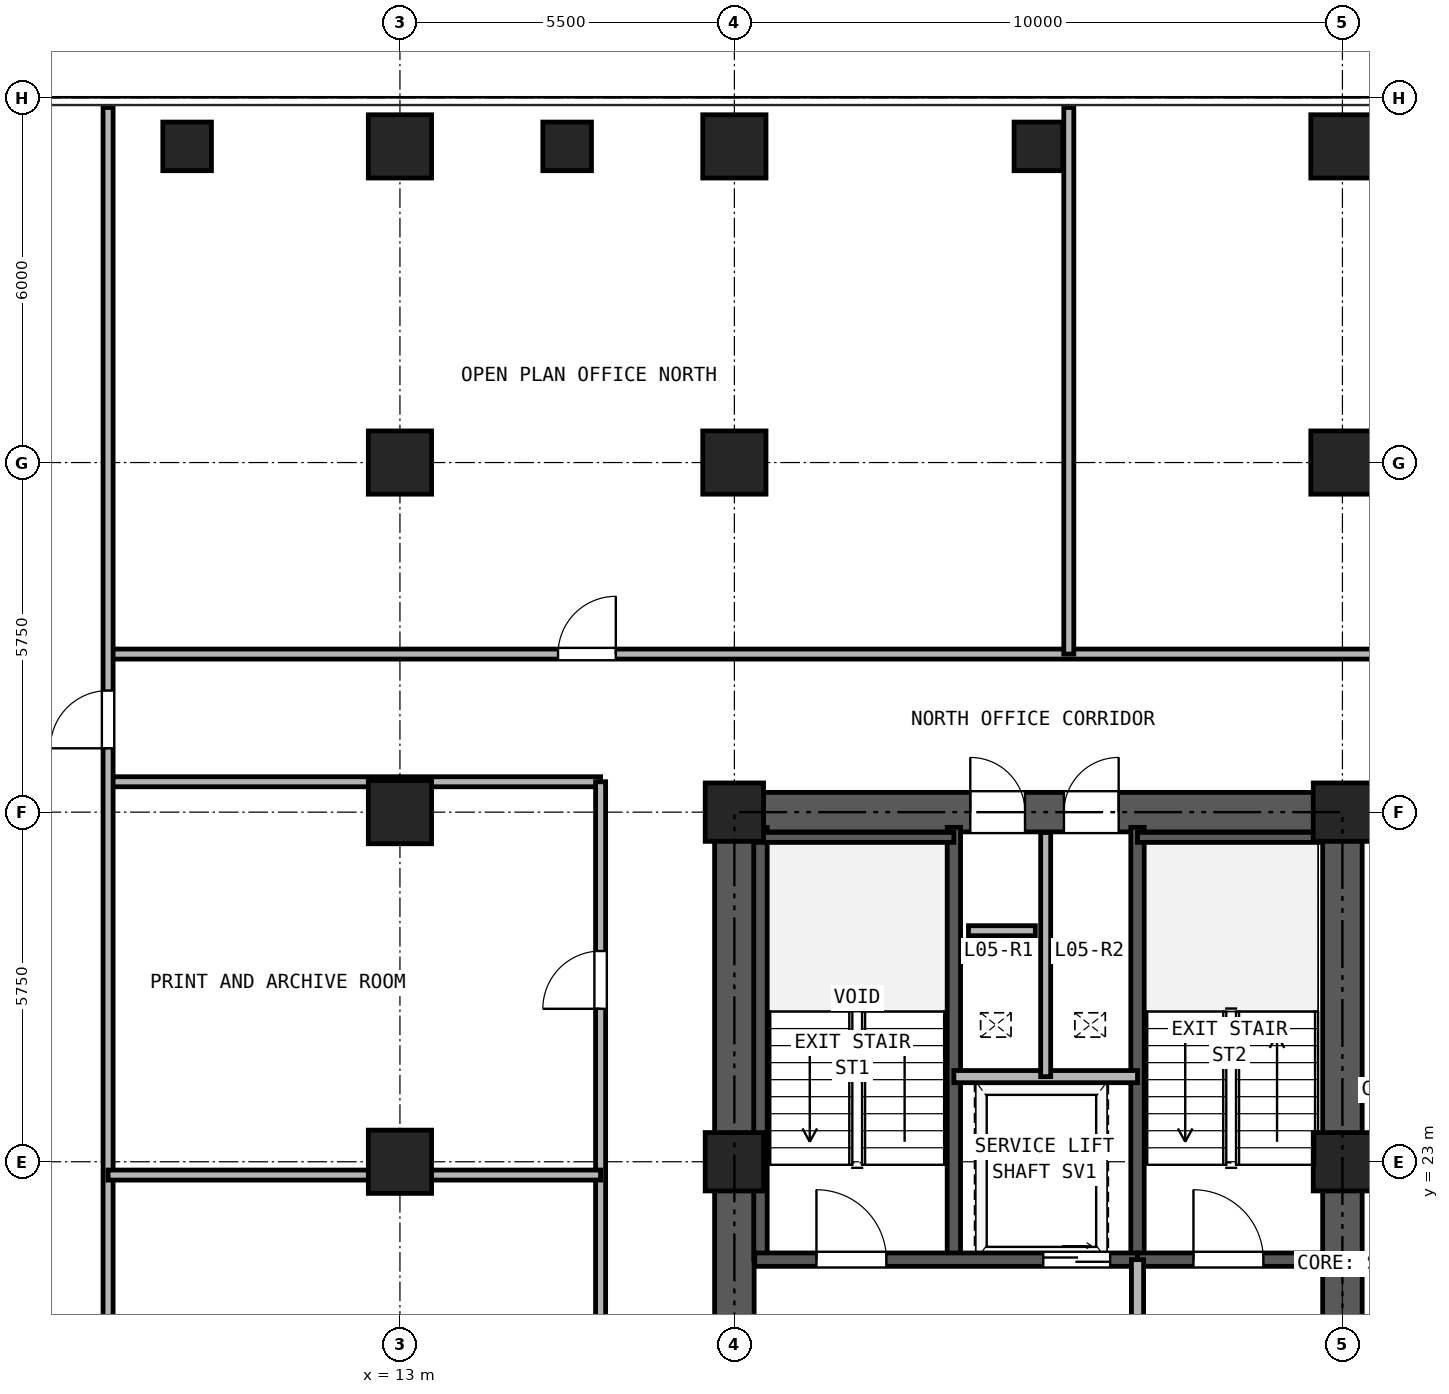
"""IFC4 building model, lengths in metres.
Left out: names, types, materials, properties, quantities, classifications, styles, units other than length and angle.
Written with IfcOpenShell. Run it as: python <this file> out.ifc"""

import sys

from ifc_helpers import new_model, si_unit, direction, frame, frame_2d, origin, origin_2d, place, context, subcontext, project, spatial, rectangle, hollow_rectangle, extrude, source, transform, mapped, element, fill, save


model = new_model("IFC4")
c1 = context("Model", 3, precision=1e-05, world=origin(), true_north=direction((0.0, 1.0)))
c2 = subcontext(c1, "Body", "Model", "MODEL_VIEW")
j1 = project(units=[si_unit("LENGTHUNIT", "METRE"), si_unit("PLANEANGLEUNIT", "RADIAN")], contexts=[c1])
p1 = place(None, origin())
s1 = spatial("IfcSite", under=j1, at=p1, CompositionType="ELEMENT")
p2 = place(p1, origin())
s2 = spatial("IfcBuilding", under=s1, at=p2, CompositionType="ELEMENT")
p3 = place(p2, frame((0.0, 0.0, 22.5)))
s3 = spatial("IfcBuildingStorey", under=s2, at=p3, CompositionType="ELEMENT", Elevation=22.5)
m1 = source(origin(), c2, "Body", "SweptSolid", [
    extrude(hollow_rectangle(XDim=1.04, YDim=1.04, WallThickness=0.065, at=origin_2d()), origin(), (0.0, 0.0, 1.0), 3.32),
])
for number, where, z_axis, x_axis in (
    (1, (13.0, 39.7, 0.0), (0.0, 0.0, 1.0), (1.0, 0.0, 0.0)),
    (2, (18.5, 39.7, 0.0), (0.0, 0.0, 1.0), (1.0, 0.0, 0.0)),
    (3, (28.5, 39.7, 0.0), (0.0, 0.0, 1.0), (1.0, 0.0, 0.0)),
    (4, (13.0, 23.0, 0.0), (0.0, 0.0, 1.0), (1.0, 0.0, 0.0)),
    (5, (13.0, 28.75, 0.0), (0.0, 0.0, 1.0), (1.0, 0.0, 0.0)),
    (6, (13.0, 34.5, 0.0), (0.0, 0.0, 1.0), (1.0, 0.0, 0.0)),
):
    element("IfcColumn", number, at=place(p3, frame(where, z_axis=z_axis, x_axis=x_axis)), inside=s3, PredefinedType="COLUMN", context=c2, shape_type="MappedRepresentation", body=[
        mapped(m1, transform((0.0, 0.0, 0.0), x_axis=(1.0, 0.0, 0.0), y_axis=(0.0, 1.0, 0.0), z_axis=(0.0, 0.0, 1.0), scale=1.0)),
    ])
m2 = source(origin(), c2, "Body", "SweptSolid", [
    extrude(hollow_rectangle(XDim=0.96, YDim=0.96, WallThickness=0.06, at=origin_2d()), origin(), (0.0, 0.0, 1.0), 3.32),
])
for number, where, z_axis, x_axis in (
    (7, (18.5, 23.0, 0.0), (0.0, 0.0, 1.0), (1.0, 0.0, 0.0)),
    (8, (18.5, 28.75, 0.0), (0.0, 0.0, 1.0), (1.0, 0.0, 0.0)),
):
    element("IfcColumn", number, at=place(p3, frame(where, z_axis=z_axis, x_axis=x_axis)), inside=s3, PredefinedType="COLUMN", context=c2, shape_type="MappedRepresentation", body=[
        mapped(m2, transform((0.0, 0.0, 0.0), x_axis=(1.0, 0.0, 0.0), y_axis=(0.0, 1.0, 0.0), z_axis=(0.0, 0.0, 1.0), scale=1.0)),
    ])
p4 = place(p3, frame((18.5, 34.5, 0.0), z_axis=(0.0, 0.0, 1.0), x_axis=(1.0, 0.0, 0.0)))
e9 = element("IfcColumn", 9, at=p4, inside=s3, PredefinedType="COLUMN", context=c2, shape_type="MappedRepresentation", body=[
    mapped(m1, transform((0.0, 0.0, 0.0), x_axis=(1.0, 0.0, 0.0), y_axis=(0.0, 1.0, 0.0), z_axis=(0.0, 0.0, 1.0), scale=1.0)),
])
for number, where, z_axis, x_axis in (
    (10, (28.5, 23.0, 0.0), (0.0, 0.0, 1.0), (1.0, 0.0, 0.0)),
    (11, (28.5, 28.75, 0.0), (0.0, 0.0, 1.0), (1.0, 0.0, 0.0)),
):
    element("IfcColumn", number, at=place(p3, frame(where, z_axis=z_axis, x_axis=x_axis)), inside=s3, PredefinedType="COLUMN", context=c2, shape_type="MappedRepresentation", body=[
        mapped(m2, transform((0.0, 0.0, 0.0), x_axis=(1.0, 0.0, 0.0), y_axis=(0.0, 1.0, 0.0), z_axis=(0.0, 0.0, 1.0), scale=1.0)),
    ])
p5 = place(p3, frame((28.5, 34.5, 0.0), z_axis=(0.0, 0.0, 1.0), x_axis=(1.0, 0.0, 0.0)))
e12 = element("IfcColumn", 12, at=p5, inside=s3, PredefinedType="COLUMN", context=c2, shape_type="MappedRepresentation", body=[
    mapped(m1, transform((0.0, 0.0, 0.0), x_axis=(1.0, 0.0, 0.0), y_axis=(0.0, 1.0, 0.0), z_axis=(0.0, 0.0, 1.0), scale=1.0)),
])
m3 = source(origin(), c2, "Body", "SweptSolid", [
    extrude(hollow_rectangle(XDim=0.8, YDim=0.8, WallThickness=0.045, at=origin_2d()), origin(), (0.0, 0.0, 1.0), 3.68),
])
for number, where, z_axis, x_axis in (
    (13, (9.5, 39.7, -0.36), (0.0, 0.0, 1.0), (1.0, 0.0, 0.0)),
    (14, (15.75, 39.7, -0.36), (0.0, 0.0, 1.0), (1.0, 0.0, 0.0)),
    (15, (23.5, 39.7, -0.36), (0.0, 0.0, 1.0), (1.0, 0.0, 0.0)),
):
    element("IfcColumn", number, at=place(p3, frame(where, z_axis=z_axis, x_axis=x_axis)), inside=s3, PredefinedType="COLUMN", context=c2, shape_type="MappedRepresentation", body=[
        mapped(m3, transform((0.0, 0.0, 0.0), x_axis=(1.0, 0.0, 0.0), y_axis=(0.0, 1.0, 0.0), z_axis=(0.0, 0.0, 1.0), scale=1.0)),
    ])
p6 = place(p3, frame((18.175, 28.75, 0.0), z_axis=(0.0, 0.0, 1.0), x_axis=(1.0, 0.0, 0.0)))
e16 = element("IfcWall", 16, at=p6, inside=s3, PredefinedType="SHEAR", context=c2, shape_type="SweptSolid", body=[
    extrude(rectangle(XDim=10.65, YDim=0.65, at=frame_2d((5.325, 0.0))), origin(), (0.0, 0.0, 1.0), 3.32),
])
p7 = place(p6, frame((4.205, 0.0, 0.0)))
e17 = element("IfcOpeningElement", 17, at=p7, cuts=e16, PredefinedType="OPENING", context=c2, shape_type="SweptSolid", body=[
    extrude(rectangle(XDim=0.9, YDim=2.05, at=frame_2d((0.45, 1.025))), frame((0.0, 0.335, 0.0), z_axis=(0.0, -1.0, 0.0), x_axis=(1.0, 0.0, 0.0)), (0.0, 0.0, 1.0), 0.67),
])
p8 = place(p6, frame((5.745, 0.0, 0.0)))
e18 = element("IfcOpeningElement", 18, at=p8, cuts=e16, PredefinedType="OPENING", context=c2, shape_type="SweptSolid", body=[
    extrude(rectangle(XDim=0.9, YDim=2.05, at=frame_2d((0.45, 1.025))), frame((0.0, 0.335, 0.0), z_axis=(0.0, -1.0, 0.0), x_axis=(1.0, 0.0, 0.0)), (0.0, 0.0, 1.0), 0.67),
])
p9 = place(p3, frame((18.5, 11.825, 0.0), z_axis=(0.0, 0.0, 1.0), x_axis=(0.0, 1.0, 0.0)))
e19 = element("IfcWall", 19, at=p9, inside=s3, PredefinedType="SHEAR", context=c2, shape_type="SweptSolid", body=[
    extrude(rectangle(XDim=16.6, YDim=0.65, at=frame_2d((8.3, 0.0))), origin(), (0.0, 0.0, 1.0), 3.32),
])
p10 = place(p9, frame((7.325, 0.0, 0.0)))
e20 = element("IfcOpeningElement", 20, at=p10, cuts=e19, PredefinedType="OPENING", context=c2, shape_type="SweptSolid", body=[
    extrude(rectangle(XDim=1.15, YDim=2.2, at=frame_2d((0.575, 1.1))), frame((0.0, 0.335, 0.0), z_axis=(0.0, -1.0, 0.0), x_axis=(1.0, 0.0, 0.0)), (0.0, 0.0, 1.0), 0.67),
])
p11 = place(p3, frame((28.5, 11.825, 0.0), z_axis=(0.0, 0.0, 1.0), x_axis=(0.0, 1.0, 0.0)))
e21 = element("IfcWall", 21, at=p11, inside=s3, PredefinedType="SHEAR", context=c2, shape_type="SweptSolid", body=[
    extrude(rectangle(XDim=16.6, YDim=0.65, at=frame_2d((8.3, 0.0))), origin(), (0.0, 0.0, 1.0), 3.32),
])
p12 = place(p11, frame((7.325, 0.0, 0.0)))
e22 = element("IfcOpeningElement", 22, at=p12, cuts=e21, PredefinedType="OPENING", context=c2, shape_type="SweptSolid", body=[
    extrude(rectangle(XDim=1.15, YDim=2.2, at=frame_2d((0.575, 1.1))), frame((0.0, 0.335, 0.0), z_axis=(0.0, -1.0, 0.0), x_axis=(1.0, 0.0, 0.0)), (0.0, 0.0, 1.0), 0.67),
])
for number, where, z_axis, x_axis in (
    (23, (18.93, 21.39, 0.0), (0.0, 0.0, 1.0), (0.0, 1.0, 0.0)),
    (24, (22.11, 21.39, 0.0), (0.0, 0.0, 1.0), (0.0, 1.0, 0.0)),
    (25, (25.13, 21.39, 0.0), (0.0, 0.0, 1.0), (0.0, 1.0, 0.0)),
):
    element("IfcWall", number, at=place(p3, frame(where, z_axis=z_axis, x_axis=x_axis)), inside=s3, PredefinedType="SOLIDWALL", context=c2, shape_type="SweptSolid", body=[
        extrude(rectangle(XDim=7.11, YDim=0.22, at=frame_2d((3.555, 0.0))), origin(), (0.0, 0.0, 1.0), 3.32),
    ])
p13 = place(p3, frame((18.835, 28.335, 0.0), z_axis=(0.0, 0.0, 1.0), x_axis=(1.0, 0.0, 0.0)))
e26 = element("IfcWall", 26, at=p13, inside=s3, PredefinedType="PARTITIONING", context=c2, shape_type="SweptSolid", body=[
    extrude(rectangle(XDim=3.275, YDim=0.165, at=frame_2d((1.638, 0.0))), origin(), (0.0, 0.0, 1.0), 3.32),
])
p14 = place(p3, frame((25.13, 28.335, 0.0), z_axis=(0.0, 0.0, 1.0), x_axis=(1.0, 0.0, 0.0)))
e27 = element("IfcWall", 27, at=p14, inside=s3, PredefinedType="PARTITIONING", context=c2, shape_type="SweptSolid", body=[
    extrude(rectangle(XDim=3.035, YDim=0.165, at=frame_2d((1.518, 0.0))), origin(), (0.0, 0.0, 1.0), 3.32),
])
p15 = place(p3, frame((18.835, 21.39, 0.0), z_axis=(0.0, 0.0, 1.0), x_axis=(1.0, 0.0, 0.0)))
e28 = element("IfcWall", 28, at=p15, inside=s3, PredefinedType="SOLIDWALL", context=c2, shape_type="SweptSolid", body=[
    extrude(rectangle(XDim=6.295, YDim=0.22, at=frame_2d((3.147, 0.0))), origin(), (0.0, 0.0, 1.0), 3.32),
])
p16 = place(p15, frame((1.015, 0.0, 0.0)))
e29 = element("IfcOpeningElement", 29, at=p16, cuts=e28, PredefinedType="OPENING", context=c2, shape_type="SweptSolid", body=[
    extrude(rectangle(XDim=1.15, YDim=2.2, at=frame_2d((0.575, 1.1))), frame((0.0, 0.12, 0.0), z_axis=(0.0, -1.0, 0.0), x_axis=(1.0, 0.0, 0.0)), (0.0, 0.0, 1.0), 0.24),
])
p17 = place(p15, frame((4.745, 0.0, 0.0)))
e30 = element("IfcOpeningElement", 30, at=p17, cuts=e28, PredefinedType="OPENING", context=c2, shape_type="SweptSolid", body=[
    extrude(rectangle(XDim=1.1, YDim=2.25, at=frame_2d((0.55, 1.125))), frame((0.0, 0.12, 0.0), z_axis=(0.0, -1.0, 0.0), x_axis=(1.0, 0.0, 0.0)), (0.0, 0.0, 1.0), 0.24),
])
p18 = place(p3, frame((25.13, 21.39, 0.0), z_axis=(0.0, 0.0, 1.0), x_axis=(1.0, 0.0, 0.0)))
e31 = element("IfcWall", 31, at=p18, inside=s3, PredefinedType="SOLIDWALL", context=c2, shape_type="SweptSolid", body=[
    extrude(rectangle(XDim=3.035, YDim=0.22, at=frame_2d((1.518, 0.0))), origin(), (0.0, 0.0, 1.0), 3.32),
])
p19 = place(p18, frame((0.92, 0.0, 0.0)))
e32 = element("IfcOpeningElement", 32, at=p19, cuts=e31, PredefinedType="OPENING", context=c2, shape_type="SweptSolid", body=[
    extrude(rectangle(XDim=1.15, YDim=2.2, at=frame_2d((0.575, 1.1))), frame((0.0, 0.12, 0.0), z_axis=(0.0, -1.0, 0.0), x_axis=(1.0, 0.0, 0.0)), (0.0, 0.0, 1.0), 0.24),
])
p20 = place(p3, frame((22.11, 24.4, 0.0), z_axis=(0.0, 0.0, 1.0), x_axis=(1.0, 0.0, 0.0)))
e33 = element("IfcWall", 33, at=p20, inside=s3, PredefinedType="PARTITIONING", context=c2, shape_type="SweptSolid", body=[
    extrude(rectangle(XDim=3.02, YDim=0.2, at=frame_2d((1.51, 0.0))), origin(), (0.0, 0.0, 1.0), 3.32),
])
p21 = place(p3, frame((23.62, 24.4, 0.0), z_axis=(0.0, 0.0, 1.0), x_axis=(0.0, 1.0, 0.0)))
e34 = element("IfcWall", 34, at=p21, inside=s3, PredefinedType="PARTITIONING", context=c2, shape_type="SweptSolid", body=[
    extrude(rectangle(XDim=4.015, YDim=0.165, at=frame_2d((2.008, 0.0))), origin(), (0.0, 0.0, 1.0), 3.32),
])
p22 = place(p3, frame((25.13, 18.0, 0.0), z_axis=(0.0, 0.0, 1.0), x_axis=(0.0, 1.0, 0.0)))
e35 = element("IfcWall", 35, at=p22, inside=s3, PredefinedType="PARTITIONING", context=c2, shape_type="SweptSolid", body=[
    extrude(rectangle(XDim=3.39, YDim=0.2, at=frame_2d((1.695, 0.0))), origin(), (0.0, 0.0, 1.0), 3.32),
])
p23 = place(p22, frame((1.1, 0.0, 0.0)))
e36 = element("IfcOpeningElement", 36, at=p23, cuts=e35, PredefinedType="OPENING", context=c2, shape_type="SweptSolid", body=[
    extrude(rectangle(XDim=1.15, YDim=2.2, at=frame_2d((0.575, 1.1))), frame((0.0, 0.11, 0.0), z_axis=(0.0, -1.0, 0.0), x_axis=(1.0, 0.0, 0.0)), (0.0, 0.0, 1.0), 0.22),
])
p24 = place(p3, frame((8.2, 31.35, 0.0), z_axis=(0.0, 0.0, 1.0), x_axis=(1.0, 0.0, 0.0)))
e37 = element("IfcWall", 37, at=p24, inside=s3, PredefinedType="PARTITIONING", context=c2, shape_type="SweptSolid", body=[
    extrude(rectangle(XDim=30.6, YDim=0.165, at=frame_2d((15.3, 0.0))), origin(), (0.0, 0.0, 1.0), 3.32),
])
p25 = place(p24, frame((7.4, 0.0, 0.0)))
e38 = element("IfcOpeningElement", 38, at=p25, cuts=e37, PredefinedType="OPENING", context=c2, shape_type="SweptSolid", body=[
    extrude(rectangle(XDim=0.95, YDim=2.15, at=frame_2d((0.475, 1.075))), frame((0.0, 0.093, 0.0), z_axis=(0.0, -1.0, 0.0), x_axis=(1.0, 0.0, 0.0)), (0.0, 0.0, 1.0), 0.185),
])
p26 = place(p24, frame((22.7, 0.0, 0.0)))
e39 = element("IfcOpeningElement", 39, at=p26, cuts=e37, PredefinedType="OPENING", context=c2, shape_type="SweptSolid", body=[
    extrude(rectangle(XDim=0.95, YDim=2.15, at=frame_2d((0.475, 1.075))), frame((0.0, 0.093, 0.0), z_axis=(0.0, -1.0, 0.0), x_axis=(1.0, 0.0, 0.0)), (0.0, 0.0, 1.0), 0.185),
])
p27 = place(p3, frame((8.2, 29.25, 0.0), z_axis=(0.0, 0.0, 1.0), x_axis=(1.0, 0.0, 0.0)))
e40 = element("IfcWall", 40, at=p27, inside=s3, PredefinedType="PARTITIONING", context=c2, shape_type="SweptSolid", body=[
    extrude(rectangle(XDim=8.1, YDim=0.165, at=frame_2d((4.05, 0.0))), origin(), (0.0, 0.0, 1.0), 3.32),
])
p28 = place(p3, frame((16.3, 10.9, 0.0), z_axis=(0.0, 0.0, 1.0), x_axis=(0.0, 1.0, 0.0)))
e41 = element("IfcWall", 41, at=p28, inside=s3, PredefinedType="PARTITIONING", context=c2, shape_type="SweptSolid", body=[
    extrude(rectangle(XDim=18.35, YDim=0.165, at=frame_2d((9.175, 0.0))), origin(), (0.0, 0.0, 1.0), 3.32),
])
p29 = place(p28, frame((5.44, 0.0, 0.0)))
e42 = element("IfcOpeningElement", 42, at=p29, cuts=e41, PredefinedType="OPENING", context=c2, shape_type="SweptSolid", body=[
    extrude(rectangle(XDim=0.95, YDim=2.15, at=frame_2d((0.475, 1.075))), frame((0.0, 0.093, 0.0), z_axis=(0.0, -1.0, 0.0), x_axis=(1.0, 0.0, 0.0)), (0.0, 0.0, 1.0), 0.185),
])
p30 = place(p28, frame((14.616, 0.0, 0.0)))
e43 = element("IfcOpeningElement", 43, at=p30, cuts=e41, PredefinedType="OPENING", context=c2, shape_type="SweptSolid", body=[
    extrude(rectangle(XDim=0.95, YDim=2.15, at=frame_2d((0.475, 1.075))), frame((0.0, 0.093, 0.0), z_axis=(0.0, -1.0, 0.0), x_axis=(1.0, 0.0, 0.0)), (0.0, 0.0, 1.0), 0.185),
])
p31 = place(p3, frame((8.2, 0.16, 0.0), z_axis=(0.0, 0.0, 1.0), x_axis=(0.0, 1.0, 0.0)))
e44 = element("IfcWall", 44, at=p31, inside=s3, PredefinedType="PARTITIONING", context=c2, shape_type="SweptSolid", body=[
    extrude(rectangle(XDim=40.18, YDim=0.165, at=frame_2d((20.09, 0.0))), origin(), (0.0, 0.0, 1.0), 3.32),
])
p32 = place(p31, frame((9.19, 0.0, 0.0)))
e45 = element("IfcOpeningElement", 45, at=p32, cuts=e44, PredefinedType="OPENING", context=c2, shape_type="SweptSolid", body=[
    extrude(rectangle(XDim=0.95, YDim=2.15, at=frame_2d((0.475, 1.075))), frame((0.0, 0.093, 0.0), z_axis=(0.0, -1.0, 0.0), x_axis=(1.0, 0.0, 0.0)), (0.0, 0.0, 1.0), 0.185),
])
p33 = place(p31, frame((29.64, 0.0, 0.0)))
e46 = element("IfcOpeningElement", 46, at=p33, cuts=e44, PredefinedType="OPENING", context=c2, shape_type="SweptSolid", body=[
    extrude(rectangle(XDim=0.95, YDim=2.15, at=frame_2d((0.475, 1.075))), frame((0.0, 0.093, 0.0), z_axis=(0.0, -1.0, 0.0), x_axis=(1.0, 0.0, 0.0)), (0.0, 0.0, 1.0), 0.185),
])
p34 = place(p3, frame((24.0, 31.35, 0.0), z_axis=(0.0, 0.0, 1.0), x_axis=(0.0, 1.0, 0.0)))
e47 = element("IfcWall", 47, at=p34, inside=s3, PredefinedType="PARTITIONING", context=c2, shape_type="SweptSolid", body=[
    extrude(rectangle(XDim=8.99, YDim=0.165, at=frame_2d((4.495, 0.0))), origin(), (0.0, 0.0, 1.0), 3.32),
])
p35 = place(p3, frame((8.2, 22.781, 0.0), z_axis=(0.0, 0.0, 1.0), x_axis=(1.0, 0.0, 0.0)))
e48 = element("IfcWall", 48, at=p35, inside=s3, PredefinedType="PARTITIONING", context=c2, shape_type="SweptSolid", body=[
    extrude(rectangle(XDim=8.1, YDim=0.165, at=frame_2d((4.05, 0.0))), origin(), (0.0, 0.0, 1.0), 2.539),
])
p36 = place(p3, frame((22.35, 26.8, 0.0), z_axis=(0.0, 0.0, 1.0), x_axis=(1.0, 0.0, 0.0)))
e49 = element("IfcWall", 49, at=p36, inside=s3, PredefinedType="PARTITIONING", context=c2, shape_type="SweptSolid", body=[
    extrude(rectangle(XDim=1.1, YDim=0.165, at=frame_2d((0.55, 0.0))), origin(), (0.0, 0.0, 1.0), 3.32),
])
p37 = place(p16, frame((1.15, 0.0, 0.0), z_axis=(0.0, 0.0, 1.0), x_axis=(-1.0, 0.0, 0.0)))
e50 = element("IfcDoor", 50, at=p37, inside=s3, OperationType="SINGLE_SWING_LEFT", PredefinedType="DOOR", context=c2, shape_type="SweptSolid", body=[
    extrude(rectangle(XDim=1.15, YDim=2.2, at=frame_2d((0.575, 1.1))), frame((0.0, 0.025, 0.0), z_axis=(0.0, -1.0, 0.0), x_axis=(1.0, 0.0, 0.0)), (0.0, 0.0, 1.0), 0.05),
])
fill(e29, e50)
p38 = place(p19, frame((1.15, 0.0, 0.0), z_axis=(0.0, 0.0, 1.0), x_axis=(-1.0, 0.0, 0.0)))
e51 = element("IfcDoor", 51, at=p38, inside=s3, OperationType="SINGLE_SWING_LEFT", PredefinedType="DOOR", context=c2, shape_type="SweptSolid", body=[
    extrude(rectangle(XDim=1.15, YDim=2.2, at=frame_2d((0.575, 1.1))), frame((0.0, 0.025, 0.0), z_axis=(0.0, -1.0, 0.0), x_axis=(1.0, 0.0, 0.0)), (0.0, 0.0, 1.0), 0.05),
])
fill(e32, e51)
p39 = place(p17, frame((1.1, 0.0, 0.0), z_axis=(0.0, 0.0, 1.0), x_axis=(-1.0, 0.0, 0.0)))
e52 = element("IfcDoor", 52, at=p39, inside=s3, OperationType="DOUBLE_DOOR_SLIDING", PredefinedType="DOOR", context=c2, shape_type="SweptSolid", body=[
    extrude(rectangle(XDim=1.1, YDim=2.25, at=frame_2d((0.55, 1.125))), frame((0.0, 0.025, 0.0), z_axis=(0.0, -1.0, 0.0), x_axis=(1.0, 0.0, 0.0)), (0.0, 0.0, 1.0), 0.05),
])
fill(e30, e52)
p40 = place(p7, origin())
e53 = element("IfcDoor", 53, at=p40, inside=s3, OperationType="SINGLE_SWING_LEFT", PredefinedType="DOOR", context=c2, shape_type="SweptSolid", body=[
    extrude(rectangle(XDim=0.9, YDim=2.05, at=frame_2d((0.45, 1.025))), frame((0.0, 0.025, 0.0), z_axis=(0.0, -1.0, 0.0), x_axis=(1.0, 0.0, 0.0)), (0.0, 0.0, 1.0), 0.05),
])
fill(e17, e53)
p41 = place(p8, origin())
e54 = element("IfcDoor", 54, at=p41, inside=s3, OperationType="SINGLE_SWING_RIGHT", PredefinedType="DOOR", context=c2, shape_type="SweptSolid", body=[
    extrude(rectangle(XDim=0.9, YDim=2.05, at=frame_2d((0.45, 1.025))), frame((0.0, 0.025, 0.0), z_axis=(0.0, -1.0, 0.0), x_axis=(1.0, 0.0, 0.0)), (0.0, 0.0, 1.0), 0.05),
])
fill(e18, e54)
p42 = place(p25, origin())
e55 = element("IfcDoor", 55, at=p42, inside=s3, OperationType="SINGLE_SWING_RIGHT", PredefinedType="DOOR", context=c2, shape_type="SweptSolid", body=[
    extrude(rectangle(XDim=0.95, YDim=2.15, at=frame_2d((0.475, 1.075))), frame((0.0, 0.025, 0.0), z_axis=(0.0, -1.0, 0.0), x_axis=(1.0, 0.0, 0.0)), (0.0, 0.0, 1.0), 0.05),
])
fill(e38, e55)
p43 = place(p33, frame((0.95, 0.0, 0.0), z_axis=(0.0, 0.0, 1.0), x_axis=(-1.0, 0.0, 0.0)))
e56 = element("IfcDoor", 56, at=p43, inside=s3, OperationType="SINGLE_SWING_LEFT", PredefinedType="DOOR", context=c2, shape_type="SweptSolid", body=[
    extrude(rectangle(XDim=0.95, YDim=2.15, at=frame_2d((0.475, 1.075))), frame((0.0, 0.025, 0.0), z_axis=(0.0, -1.0, 0.0), x_axis=(1.0, 0.0, 0.0)), (0.0, 0.0, 1.0), 0.05),
])
fill(e46, e56)
p44 = place(p30, frame((0.95, 0.0, 0.0), z_axis=(0.0, 0.0, 1.0), x_axis=(-1.0, 0.0, 0.0)))
e57 = element("IfcDoor", 57, at=p44, inside=s3, OperationType="SINGLE_SWING_LEFT", PredefinedType="DOOR", context=c2, shape_type="SweptSolid", body=[
    extrude(rectangle(XDim=0.95, YDim=2.15, at=frame_2d((0.475, 1.075))), frame((0.0, 0.025, 0.0), z_axis=(0.0, -1.0, 0.0), x_axis=(1.0, 0.0, 0.0)), (0.0, 0.0, 1.0), 0.05),
])
fill(e43, e57)
save(model, sys.argv[1])
